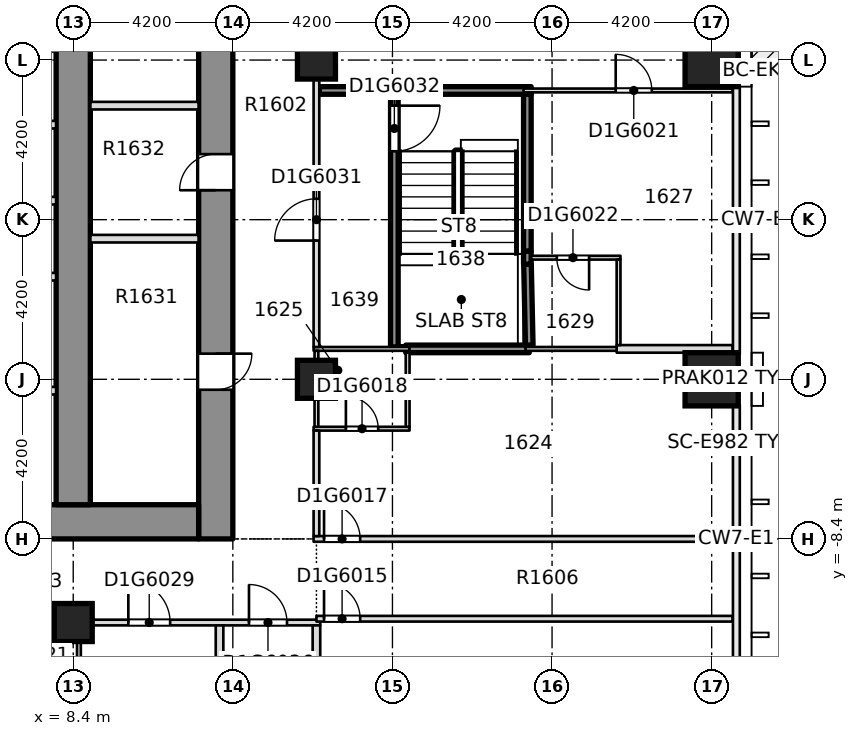
"""IFC4 building model, lengths in metres.
Left out: names, types, materials, properties, quantities, classifications, styles, units other than length and angle.
Written with IfcOpenShell. Run it as: python <this file> out.ifc"""

import sys

from ifc_helpers import new_model, si_unit, direction, frame, frame_2d, origin, origin_2d, place, context, subcontext, project, spatial, rectangle, extrude, element, fill, save


model = new_model("IFC4")
c1 = context("Model", 3, precision=1e-05, world=origin(), true_north=direction((0.0, 1.0)))
c2 = subcontext(c1, "Body", "Model", "MODEL_VIEW")
j1 = project(units=[si_unit("LENGTHUNIT", "METRE"), si_unit("PLANEANGLEUNIT", "RADIAN")], contexts=[c1])
p1 = place(None, origin())
s1 = spatial("IfcSite", under=j1, at=p1, CompositionType="ELEMENT")
p2 = place(p1, origin())
s2 = spatial("IfcBuilding", under=s1, at=p2, CompositionType="ELEMENT")
p3 = place(p2, frame((0.0, 0.0, 69.0)))
s3 = spatial("IfcBuildingStorey", under=s2, at=p3, CompositionType="ELEMENT", Elevation=69.0)
p4 = place(p3, frame((12.15, -8.4, -0.32), z_axis=(0.0, 0.0, 1.0), x_axis=(0.0, 1.0, 0.0)))
e1 = element("IfcWall", 1, at=p4, inside=s3, PredefinedType="SHEAR", context=c2, shape_type="SweptSolid", body=[
    extrude(rectangle(XDim=30.15, YDim=0.9, at=frame_2d((15.075, 0.0))), origin(), (0.0, 0.0, 1.0), 3.45),
])
p5 = place(p4, frame((3.925, 0.0, 0.32)))
e2 = element("IfcOpeningElement", 2, at=p5, cuts=e1, PredefinedType="OPENING", context=c2, shape_type="SweptSolid", body=[
    extrude(rectangle(XDim=0.95, YDim=2.1, at=frame_2d((0.475, 1.05))), frame((0.0, 0.46, 0.0), z_axis=(0.0, -1.0, 0.0), x_axis=(1.0, 0.0, 0.0)), (0.0, 0.0, 1.0), 0.92),
])
p6 = place(p4, frame((9.175, 0.0, 0.32)))
e3 = element("IfcOpeningElement", 3, at=p6, cuts=e1, PredefinedType="OPENING", context=c2, shape_type="SweptSolid", body=[
    extrude(rectangle(XDim=0.95, YDim=2.1, at=frame_2d((0.475, 1.05))), frame((0.0, 0.46, 0.0), z_axis=(0.0, -1.0, 0.0), x_axis=(1.0, 0.0, 0.0)), (0.0, 0.0, 1.0), 0.92),
])
p7 = place(p4, frame((14.525, 0.0, 0.32)))
e4 = element("IfcOpeningElement", 4, at=p7, cuts=e1, PredefinedType="OPENING", context=c2, shape_type="SweptSolid", body=[
    extrude(rectangle(XDim=0.95, YDim=2.1, at=frame_2d((0.475, 1.05))), frame((0.0, 0.46, 0.0), z_axis=(0.0, -1.0, 0.0), x_axis=(1.0, 0.0, 0.0)), (0.0, 0.0, 1.0), 0.92),
])
p8 = place(p4, frame((22.225, 0.0, 0.32)))
e5 = element("IfcOpeningElement", 5, at=p8, cuts=e1, PredefinedType="OPENING", context=c2, shape_type="SweptSolid", body=[
    extrude(rectangle(XDim=0.95, YDim=2.1, at=frame_2d((0.475, 1.05))), frame((0.0, 0.46, 0.0), z_axis=(0.0, -1.0, 0.0), x_axis=(1.0, 0.0, 0.0)), (0.0, 0.0, 1.0), 0.92),
])
p9 = place(p4, frame((26.25, 0.0, 0.32)))
e6 = element("IfcOpeningElement", 6, at=p9, cuts=e1, PredefinedType="OPENING", context=c2, shape_type="SweptSolid", body=[
    extrude(rectangle(XDim=0.95, YDim=2.1, at=frame_2d((0.475, 1.05))), frame((0.0, 0.46, 0.0), z_axis=(0.0, -1.0, 0.0), x_axis=(1.0, 0.0, 0.0)), (0.0, 0.0, 1.0), 0.92),
])
p10 = place(p4, frame((19.3, 0.0, 0.32)))
e7 = element("IfcOpeningElement", 7, at=p10, cuts=e1, PredefinedType="OPENING", context=c2, shape_type="SweptSolid", body=[
    extrude(rectangle(XDim=1.2, YDim=2.1, at=frame_2d((0.6, 1.05))), frame((0.0, 0.46, 0.0), z_axis=(0.0, -1.0, 0.0), x_axis=(1.0, 0.0, 0.0)), (0.0, 0.0, 1.0), 0.92),
])
p11 = place(p3, frame((-11.7, -7.95, -0.32), z_axis=(0.0, 0.0, 1.0), x_axis=(1.0, 0.0, 0.0)))
e8 = element("IfcWall", 8, at=p11, inside=s3, PredefinedType="SHEAR", context=c2, shape_type="SweptSolid", body=[
    extrude(rectangle(XDim=23.4, YDim=0.9, at=frame_2d((11.7, 0.0))), origin(), (0.0, 0.0, 1.0), 3.45),
])
p12 = place(p11, frame((6.95, 0.0, 0.32)))
e9 = element("IfcOpeningElement", 9, at=p12, cuts=e8, PredefinedType="OPENING", context=c2, shape_type="SweptSolid", body=[
    extrude(rectangle(XDim=1.8, YDim=2.1, at=frame_2d((0.9, 1.05))), frame((0.0, 0.46, 0.0), z_axis=(0.0, -1.0, 0.0), x_axis=(1.0, 0.0, 0.0)), (0.0, 0.0, 1.0), 0.92),
])
p13 = place(p11, frame((14.65, 0.0, 0.32)))
e10 = element("IfcOpeningElement", 10, at=p13, cuts=e8, PredefinedType="OPENING", context=c2, shape_type="SweptSolid", body=[
    extrude(rectangle(XDim=1.8, YDim=2.1, at=frame_2d((0.9, 1.05))), frame((0.0, 0.46, 0.0), z_axis=(0.0, -1.0, 0.0), x_axis=(1.0, 0.0, 0.0)), (0.0, 0.0, 1.0), 0.92),
])
p14 = place(p3, frame((8.4, -7.5, -0.32), z_axis=(0.0, 0.0, 1.0), x_axis=(0.0, 1.0, 0.0)))
e11 = element("IfcWall", 11, at=p14, inside=s3, PredefinedType="SHEAR", context=c2, shape_type="SweptSolid", body=[
    extrude(rectangle(XDim=28.35, YDim=0.9, at=frame_2d((14.175, 0.0))), origin(), (0.0, 0.0, 1.0), 3.45),
])
p15 = place(p14, frame((18.4, 0.0, 0.32)))
e12 = element("IfcOpeningElement", 12, at=p15, cuts=e11, PredefinedType="OPENING", context=c2, shape_type="SweptSolid", body=[
    extrude(rectangle(XDim=1.2, YDim=2.1, at=frame_2d((0.6, 1.05))), frame((0.0, 0.46, 0.0), z_axis=(0.0, -1.0, 0.0), x_axis=(1.0, 0.0, 0.0)), (0.0, 0.0, 1.0), 0.92),
])
for number, where, z_axis, x_axis in (
    (13, (25.2, -4.2, -0.32), (0.0, 0.0, 1.0), (1.0, 0.0, 0.0)),
    (14, (25.2, 4.2, -0.32), (0.0, 0.0, 1.0), (1.0, 0.0, 0.0)),
):
    element("IfcColumn", number, at=place(p3, frame(where, z_axis=z_axis, x_axis=x_axis)), inside=s3, PredefinedType="COLUMN", context=c2, shape_type="SweptSolid", body=[
        extrude(rectangle(XDim=1.4, YDim=1.4, at=origin_2d()), origin(), (0.0, 0.0, 1.0), 3.45),
    ])
for number, where, z_axis, x_axis in (
    (15, (8.4, -10.6, -0.32), (0.0, 0.0, 1.0), (1.0, 0.0, 0.0)),
    (16, (14.8, -4.2, -0.32), (0.0, 0.0, 1.0), (1.0, 0.0, 0.0)),
    (17, (14.8, 4.2, -0.32), (0.0, 0.0, 1.0), (1.0, 0.0, 0.0)),
):
    element("IfcColumn", number, at=place(p3, frame(where, z_axis=z_axis, x_axis=x_axis)), inside=s3, PredefinedType="COLUMN", context=c2, shape_type="SweptSolid", body=[
        extrude(rectangle(XDim=1.0, YDim=1.0, at=origin_2d()), origin(), (0.0, 0.0, 1.0), 3.45),
    ])
p16 = place(p3, frame((6.1, -10.6, 0.0), z_axis=(0.0, 0.0, 1.0), x_axis=(1.0, 0.0, 0.0)))
e18 = element("IfcWall", 18, at=p16, inside=s3, PredefinedType="PARTITIONING", context=c2, shape_type="SweptSolid", body=[
    extrude(rectangle(XDim=2.5, YDim=0.1, at=frame_2d((1.25, 0.0))), origin(), (0.0, 0.0, 1.0), 3.13),
])
p17 = place(p3, frame((8.5, -10.6, 0.0), z_axis=(0.0, 0.0, 1.0), x_axis=(1.0, 0.0, 0.0)))
e19 = element("IfcWall", 19, at=p17, inside=s3, PredefinedType="PARTITIONING", context=c2, shape_type="SweptSolid", body=[
    extrude(rectangle(XDim=6.4, YDim=0.15, at=frame_2d((3.2, 0.0))), origin(), (0.0, 0.0, 1.0), 3.13),
])
p18 = place(p17, frame((1.35, 0.0, 0.0)))
e20 = element("IfcOpeningElement", 20, at=p18, cuts=e19, PredefinedType="OPENING", context=c2, shape_type="SweptSolid", body=[
    extrude(rectangle(XDim=1.1, YDim=2.1, at=frame_2d((0.55, 1.05))), frame((0.0, 0.085, 0.0), z_axis=(0.0, -1.0, 0.0), x_axis=(1.0, 0.0, 0.0)), (0.0, 0.0, 1.0), 0.17),
])
p19 = place(p17, frame((4.525, 0.0, 0.0)))
e21 = element("IfcOpeningElement", 21, at=p19, cuts=e19, PredefinedType="OPENING", context=c2, shape_type="SweptSolid", body=[
    extrude(rectangle(XDim=1.0, YDim=2.1, at=frame_2d((0.5, 1.05))), frame((0.0, 0.085, 0.0), z_axis=(0.0, -1.0, 0.0), x_axis=(1.0, 0.0, 0.0)), (0.0, 0.0, 1.0), 0.17),
])
p20 = place(p3, frame((14.8, -10.5, 0.0), z_axis=(0.0, 0.0, 1.0), x_axis=(1.0, 0.0, 0.0)))
e22 = element("IfcWall", 22, at=p20, inside=s3, PredefinedType="PARTITIONING", context=c2, shape_type="SweptSolid", body=[
    extrude(rectangle(XDim=10.95, YDim=0.15, at=frame_2d((5.475, 0.0))), origin(), (0.0, 0.0, 1.0), 3.13),
])
p21 = place(p20, frame((0.2, 0.0, 0.0)))
e23 = element("IfcOpeningElement", 23, at=p21, cuts=e22, PredefinedType="OPENING", context=c2, shape_type="SweptSolid", body=[
    extrude(rectangle(XDim=0.95, YDim=2.1, at=frame_2d((0.475, 1.05))), frame((0.0, 0.085, 0.0), z_axis=(0.0, -1.0, 0.0), x_axis=(1.0, 0.0, 0.0)), (0.0, 0.0, 1.0), 0.17),
])
p22 = place(p3, frame((14.725, -8.4, 0.0), z_axis=(0.0, 0.0, 1.0), x_axis=(1.0, 0.0, 0.0)))
e24 = element("IfcWall", 24, at=p22, inside=s3, PredefinedType="PARTITIONING", context=c2, shape_type="SweptSolid", body=[
    extrude(rectangle(XDim=11.025, YDim=0.15, at=frame_2d((5.512, 0.0))), origin(), (0.0, 0.0, 1.0), 3.13),
])
p23 = place(p22, frame((0.275, 0.0, 0.0)))
e25 = element("IfcOpeningElement", 25, at=p23, cuts=e24, PredefinedType="OPENING", context=c2, shape_type="SweptSolid", body=[
    extrude(rectangle(XDim=0.95, YDim=2.1, at=frame_2d((0.475, 1.05))), frame((0.0, 0.085, 0.0), z_axis=(0.0, -1.0, 0.0), x_axis=(1.0, 0.0, 0.0)), (0.0, 0.0, 1.0), 0.17),
])
p24 = place(p3, frame((14.725, -5.5, 0.0), z_axis=(0.0, 0.0, 1.0), x_axis=(1.0, 0.0, 0.0)))
e26 = element("IfcWall", 26, at=p24, inside=s3, PredefinedType="PARTITIONING", context=c2, shape_type="SweptSolid", body=[
    extrude(rectangle(XDim=2.525, YDim=0.1, at=frame_2d((1.262, 0.0))), origin(), (0.0, 0.0, 1.0), 3.13),
])
p25 = place(p24, frame((0.85, 0.0, 0.0)))
e27 = element("IfcOpeningElement", 27, at=p25, cuts=e26, PredefinedType="OPENING", context=c2, shape_type="SweptSolid", body=[
    extrude(rectangle(XDim=0.85, YDim=2.1, at=frame_2d((0.425, 1.05))), frame((0.0, 0.06, 0.0), z_axis=(0.0, -1.0, 0.0), x_axis=(1.0, 0.0, 0.0)), (0.0, 0.0, 1.0), 0.12),
])
p26 = place(p3, frame((14.725, -3.4, 0.0), z_axis=(0.0, 0.0, 1.0), x_axis=(1.0, 0.0, 0.0)))
e28 = element("IfcWall", 28, at=p26, inside=s3, PredefinedType="PARTITIONING", context=c2, shape_type="SweptSolid", body=[
    extrude(rectangle(XDim=2.525, YDim=0.1, at=frame_2d((1.262, 0.0))), origin(), (0.0, 0.0, 1.0), 3.13),
])
p27 = place(p3, frame((17.15, -3.4, 0.0), z_axis=(0.0, 0.0, 1.0), x_axis=(1.0, 0.0, 0.0)))
e29 = element("IfcWall", 29, at=p27, inside=s3, PredefinedType="SOLIDWALL", context=c2, shape_type="SweptSolid", body=[
    extrude(rectangle(XDim=3.25, YDim=0.2, at=frame_2d((1.625, 0.0))), origin(), (0.0, 0.0, 1.0), 3.13),
])
p28 = place(p3, frame((20.3, -3.4, 0.0), z_axis=(0.0, 0.0, 1.0), x_axis=(1.0, 0.0, 0.0)))
e30 = element("IfcWall", 30, at=p28, inside=s3, PredefinedType="PARTITIONING", context=c2, shape_type="SweptSolid", body=[
    extrude(rectangle(XDim=2.5, YDim=0.1, at=frame_2d((1.25, 0.0))), origin(), (0.0, 0.0, 1.0), 3.13),
])
p29 = place(p3, frame((22.7, -3.4, 0.0), z_axis=(0.0, 0.0, 1.0), x_axis=(1.0, 0.0, 0.0)))
e31 = element("IfcWall", 31, at=p29, inside=s3, PredefinedType="PARTITIONING", context=c2, shape_type="SweptSolid", body=[
    extrude(rectangle(XDim=3.05, YDim=0.2, at=frame_2d((1.525, 0.0))), origin(), (0.0, 0.0, 1.0), 3.13),
])
p30 = place(p3, frame((20.45, -1.0, 0.0), z_axis=(0.0, 0.0, 1.0), x_axis=(1.0, 0.0, 0.0)))
e32 = element("IfcWall", 32, at=p30, inside=s3, PredefinedType="PARTITIONING", context=c2, shape_type="SweptSolid", body=[
    extrude(rectangle(XDim=2.35, YDim=0.1, at=frame_2d((1.175, 0.0))), origin(), (0.0, 0.0, 1.0), 3.13),
])
p31 = place(p30, frame((0.675, 0.0, 0.0)))
e33 = element("IfcOpeningElement", 33, at=p31, cuts=e32, PredefinedType="OPENING", context=c2, shape_type="SweptSolid", body=[
    extrude(rectangle(XDim=0.85, YDim=2.1, at=frame_2d((0.425, 1.05))), frame((0.0, 0.06, 0.0), z_axis=(0.0, -1.0, 0.0), x_axis=(1.0, 0.0, 0.0)), (0.0, 0.0, 1.0), 0.12),
])
p32 = place(p3, frame((14.875, 3.4, 0.0), z_axis=(0.0, 0.0, 1.0), x_axis=(1.0, 0.0, 0.0)))
e34 = element("IfcWall", 34, at=p32, inside=s3, PredefinedType="SOLIDWALL", context=c2, shape_type="SweptSolid", body=[
    extrude(rectangle(XDim=5.575, YDim=0.2, at=frame_2d((2.788, 0.0))), origin(), (0.0, 0.0, 1.0), 3.13),
])
p33 = place(p3, frame((20.25, 3.4, 0.0), z_axis=(0.0, 0.0, 1.0), x_axis=(1.0, 0.0, 0.0)))
e35 = element("IfcWall", 35, at=p33, inside=s3, PredefinedType="PARTITIONING", context=c2, shape_type="SweptSolid", body=[
    extrude(rectangle(XDim=5.5, YDim=0.1, at=frame_2d((2.75, 0.0))), origin(), (0.0, 0.0, 1.0), 3.13),
])
p34 = place(p33, frame((2.425, 0.0, 0.0)))
e36 = element("IfcOpeningElement", 36, at=p34, cuts=e35, PredefinedType="OPENING", context=c2, shape_type="SweptSolid", body=[
    extrude(rectangle(XDim=0.95, YDim=2.1, at=frame_2d((0.475, 1.05))), frame((0.0, 0.06, 0.0), z_axis=(0.0, -1.0, 0.0), x_axis=(1.0, 0.0, 0.0)), (0.0, 0.0, 1.0), 0.12),
])
p35 = place(p3, frame((8.55, -13.25, 0.0), z_axis=(0.0, 0.0, 1.0), x_axis=(0.0, 1.0, 0.0)))
e37 = element("IfcWall", 37, at=p35, inside=s3, PredefinedType="PARTITIONING", context=c2, shape_type="SweptSolid", body=[
    extrude(rectangle(XDim=2.575, YDim=0.1, at=frame_2d((1.288, 0.0))), origin(), (0.0, 0.0, 1.0), 3.13),
])
p36 = place(p3, frame((12.25, -12.998, 0.0), z_axis=(0.0, 0.0, 1.0), x_axis=(0.0, 1.0, 0.0)))
e38 = element("IfcWall", 38, at=p36, inside=s3, PredefinedType="PARTITIONING", context=c2, shape_type="SweptSolid", body=[
    extrude(rectangle(XDim=2.323, YDim=0.2, at=frame_2d((1.162, 0.0))), origin(), (0.0, 0.0, 1.0), 3.13),
])
p37 = place(p3, frame((14.8, -14.65, 0.0), z_axis=(0.0, 0.0, 1.0), x_axis=(0.0, 1.0, 0.0)))
e39 = element("IfcWall", 39, at=p37, inside=s3, PredefinedType="PARTITIONING", context=c2, shape_type="SweptSolid", body=[
    extrude(rectangle(XDim=3.975, YDim=0.2, at=frame_2d((1.987, 0.0))), origin(), (0.0, 0.0, 1.0), 3.13),
])
p38 = place(p3, frame((14.8, -8.325, 0.0), z_axis=(0.0, 0.0, 1.0), x_axis=(0.0, 1.0, 0.0)))
e40 = element("IfcWall", 40, at=p38, inside=s3, PredefinedType="PARTITIONING", context=c2, shape_type="SweptSolid", body=[
    extrude(rectangle(XDim=2.775, YDim=0.15, at=frame_2d((1.387, 0.0))), origin(), (0.0, 0.0, 1.0), 3.13),
])
p39 = place(p3, frame((14.8, -5.45, 0.0), z_axis=(0.0, 0.0, 1.0), x_axis=(0.0, 1.0, 0.0)))
e41 = element("IfcWall", 41, at=p39, inside=s3, PredefinedType="PARTITIONING", context=c2, shape_type="SweptSolid", body=[
    extrude(rectangle(XDim=2.0, YDim=0.1, at=frame_2d((1.0, 0.0))), origin(), (0.0, 0.0, 1.0), 3.13),
])
p40 = place(p3, frame((14.8, -3.35, 0.0), z_axis=(0.0, 0.0, 1.0), x_axis=(0.0, 1.0, 0.0)))
e42 = element("IfcWall", 42, at=p40, inside=s3, PredefinedType="PARTITIONING", context=c2, shape_type="SweptSolid", body=[
    extrude(rectangle(XDim=13.775, YDim=0.15, at=frame_2d((6.888, 0.0))), origin(), (0.0, 0.0, 1.0), 3.13),
])
p41 = place(p40, frame((2.8, 0.0, 0.0)))
e43 = element("IfcOpeningElement", 43, at=p41, cuts=e42, PredefinedType="OPENING", context=c2, shape_type="SweptSolid", body=[
    extrude(rectangle(XDim=1.1, YDim=2.1, at=frame_2d((0.55, 1.05))), frame((0.0, 0.085, 0.0), z_axis=(0.0, -1.0, 0.0), x_axis=(1.0, 0.0, 0.0)), (0.0, 0.0, 1.0), 0.17),
])
p42 = place(p3, frame((16.85, -3.35, 0.0), z_axis=(0.0, 0.0, 1.0), x_axis=(0.0, 1.0, 0.0)))
e44 = element("IfcWall", 44, at=p42, inside=s3, PredefinedType="SOLIDWALL", context=c2, shape_type="SweptSolid", body=[
    extrude(rectangle(XDim=6.65, YDim=0.2, at=frame_2d((3.325, 0.0))), origin(), (0.0, 0.0, 1.0), 3.13),
])
p43 = place(p42, frame((5.15, 0.0, 0.0)))
e45 = element("IfcOpeningElement", 45, at=p43, cuts=e44, PredefinedType="OPENING", context=c2, shape_type="SweptSolid", body=[
    extrude(rectangle(XDim=1.2, YDim=2.1, at=frame_2d((0.6, 1.05))), frame((0.0, 0.11, 0.0), z_axis=(0.0, -1.0, 0.0), x_axis=(1.0, 0.0, 0.0)), (0.0, 0.0, 1.0), 0.22),
])
p44 = place(p3, frame((17.2, -5.45, 0.0), z_axis=(0.0, 0.0, 1.0), x_axis=(0.0, 1.0, 0.0)))
e46 = element("IfcWall", 46, at=p44, inside=s3, PredefinedType="PARTITIONING", context=c2, shape_type="SweptSolid", body=[
    extrude(rectangle(XDim=1.95, YDim=0.1, at=frame_2d((0.975, 0.0))), origin(), (0.0, 0.0, 1.0), 3.13),
])
p45 = place(p3, frame((20.4, -3.3, 0.0), z_axis=(0.0, 0.0, 1.0), x_axis=(-0.021771342749, 0.999762976227, 0.0)))
e47 = element("IfcWall", 47, at=p45, inside=s3, PredefinedType="SOLIDWALL", context=c2, shape_type="SweptSolid", body=[
    extrude(rectangle(XDim=2.131, YDim=0.2, at=frame_2d((1.065, 0.0))), origin(), (0.0, 0.0, 1.0), 3.13),
])
p46 = place(p3, frame((20.35, -0.83, 0.0), z_axis=(0.0, 0.0, 1.0), x_axis=(0.0, 1.0, 0.0)))
e48 = element("IfcWall", 48, at=p46, inside=s3, PredefinedType="SOLIDWALL", context=c2, shape_type="SweptSolid", body=[
    extrude(rectangle(XDim=4.13, YDim=0.2, at=frame_2d((2.065, 0.0))), origin(), (0.0, 0.0, 1.0), 3.13),
])
p47 = place(p3, frame((22.75, -3.3, 0.0), z_axis=(0.0, 0.0, 1.0), x_axis=(0.0, 1.0, 0.0)))
e49 = element("IfcWall", 49, at=p47, inside=s3, PredefinedType="PARTITIONING", context=c2, shape_type="SweptSolid", body=[
    extrude(rectangle(XDim=2.25, YDim=0.1, at=frame_2d((1.125, 0.0))), origin(), (0.0, 0.0, 1.0), 3.13),
])
for number, where, z_axis, x_axis in (
    (50, (5.575, -4.5, 0.0), (0.0, 0.0, 1.0), (1.0, 0.0, 0.0)),
    (51, (5.575, -1.5, 0.0), (0.0, 0.0, 1.0), (1.0, 0.0, 0.0)),
    (52, (5.575, 0.5, 0.0), (0.0, 0.0, 1.0), (1.0, 0.0, 0.0)),
    (53, (5.575, 2.5, 0.0), (0.0, 0.0, 1.0), (1.0, 0.0, 0.0)),
):
    element("IfcWall", number, at=place(p3, frame(where, z_axis=z_axis, x_axis=x_axis)), inside=s3, PredefinedType="PARTITIONING", context=c2, shape_type="SweptSolid", body=[
        extrude(rectangle(XDim=2.374, YDim=0.2, at=frame_2d((1.187, 0.0))), origin(), (0.0, 0.0, 1.0), 3.13),
    ])
for number, where, z_axis, x_axis in (
    (54, (8.851, -0.5, 0.0), (0.0, 0.0, 1.0), (1.0, 0.0, 0.0)),
    (55, (8.851, 3.0, 0.0), (0.0, 0.0, 1.0), (1.0, 0.0, 0.0)),
):
    element("IfcWall", number, at=place(p3, frame(where, z_axis=z_axis, x_axis=x_axis)), inside=s3, PredefinedType="PARTITIONING", context=c2, shape_type="SweptSolid", body=[
        extrude(rectangle(XDim=2.848, YDim=0.2, at=frame_2d((1.424, 0.0))), origin(), (0.0, 0.0, 1.0), 3.13),
    ])
p48 = place(p3, frame((20.35, -1.17, 0.0), z_axis=(0.0, 0.0, 1.0), x_axis=(0.0, 1.0, 0.0)))
e56 = element("IfcWall", 56, at=p48, inside=s3, PredefinedType="SOLIDWALL", context=c2, shape_type="SweptSolid", body=[
    extrude(rectangle(XDim=0.34, YDim=0.2, at=frame_2d((0.17, 0.0))), origin(), (0.0, 0.0, 1.0), 3.13),
])
p49 = place(p21, origin())
e57 = element("IfcDoor", 57, at=p49, inside=s3, OperationType="SINGLE_SWING_RIGHT", PredefinedType="DOOR", context=c2, shape_type="SweptSolid", body=[
    extrude(rectangle(XDim=0.95, YDim=2.1, at=frame_2d((0.475, 1.05))), frame((0.0, 0.025, 0.0), z_axis=(0.0, -1.0, 0.0), x_axis=(1.0, 0.0, 0.0)), (0.0, 0.0, 1.0), 0.05),
])
fill(e23, e57)
p50 = place(p23, origin())
e58 = element("IfcDoor", 58, at=p50, inside=s3, OperationType="SINGLE_SWING_LEFT", PredefinedType="DOOR", context=c2, shape_type="SweptSolid", body=[
    extrude(rectangle(XDim=0.95, YDim=2.1, at=frame_2d((0.475, 1.05))), frame((0.0, 0.025, 0.0), z_axis=(0.0, -1.0, 0.0), x_axis=(1.0, 0.0, 0.0)), (0.0, 0.0, 1.0), 0.05),
])
fill(e25, e58)
p51 = place(p25, origin())
e59 = element("IfcDoor", 59, at=p51, inside=s3, OperationType="SINGLE_SWING_LEFT", PredefinedType="DOOR", context=c2, shape_type="SweptSolid", body=[
    extrude(rectangle(XDim=0.85, YDim=2.1, at=frame_2d((0.425, 1.05))), frame((0.0, 0.025, 0.0), z_axis=(0.0, -1.0, 0.0), x_axis=(1.0, 0.0, 0.0)), (0.0, 0.0, 1.0), 0.05),
])
fill(e27, e59)
p52 = place(p34, origin())
e60 = element("IfcDoor", 60, at=p52, inside=s3, OperationType="SINGLE_SWING_LEFT", PredefinedType="DOOR", context=c2, shape_type="SweptSolid", body=[
    extrude(rectangle(XDim=0.95, YDim=2.1, at=frame_2d((0.475, 1.05))), frame((0.0, 0.025, 0.0), z_axis=(0.0, -1.0, 0.0), x_axis=(1.0, 0.0, 0.0)), (0.0, 0.0, 1.0), 0.05),
])
fill(e36, e60)
p53 = place(p31, origin())
e61 = element("IfcDoor", 61, at=p53, inside=s3, OperationType="SINGLE_SWING_RIGHT", PredefinedType="DOOR", context=c2, shape_type="SweptSolid", body=[
    extrude(rectangle(XDim=0.85, YDim=2.1, at=frame_2d((0.425, 1.05))), frame((0.0, 0.025, 0.0), z_axis=(0.0, -1.0, 0.0), x_axis=(1.0, 0.0, 0.0)), (0.0, 0.0, 1.0), 0.05),
])
fill(e33, e61)
p54 = place(p18, origin())
e62 = element("IfcDoor", 62, at=p54, inside=s3, OperationType="SINGLE_SWING_RIGHT", PredefinedType="DOOR", context=c2, shape_type="SweptSolid", body=[
    extrude(rectangle(XDim=1.1, YDim=2.1, at=frame_2d((0.55, 1.05))), frame((0.0, 0.025, 0.0), z_axis=(0.0, -1.0, 0.0), x_axis=(1.0, 0.0, 0.0)), (0.0, 0.0, 1.0), 0.05),
])
fill(e20, e62)
p55 = place(p41, origin())
e63 = element("IfcDoor", 63, at=p55, inside=s3, OperationType="SINGLE_SWING_LEFT", PredefinedType="DOOR", context=c2, shape_type="SweptSolid", body=[
    extrude(rectangle(XDim=1.1, YDim=2.1, at=frame_2d((0.55, 1.05))), frame((0.0, 0.025, 0.0), z_axis=(0.0, -1.0, 0.0), x_axis=(1.0, 0.0, 0.0)), (0.0, 0.0, 1.0), 0.05),
])
fill(e43, e63)
p56 = place(p43, origin())
e64 = element("IfcDoor", 64, at=p56, inside=s3, OperationType="SINGLE_SWING_LEFT", PredefinedType="DOOR", context=c2, shape_type="SweptSolid", body=[
    extrude(rectangle(XDim=1.2, YDim=2.1, at=frame_2d((0.6, 1.05))), frame((0.0, 0.025, 0.0), z_axis=(0.0, -1.0, 0.0), x_axis=(1.0, 0.0, 0.0)), (0.0, 0.0, 1.0), 0.05),
])
fill(e45, e64)
p57 = place(p19, origin())
e65 = element("IfcDoor", 65, at=p57, inside=s3, OperationType="SINGLE_SWING_RIGHT", PredefinedType="DOOR", context=c2, shape_type="SweptSolid", body=[
    extrude(rectangle(XDim=1.0, YDim=2.1, at=frame_2d((0.5, 1.05))), frame((0.0, 0.025, 0.0), z_axis=(0.0, -1.0, 0.0), x_axis=(1.0, 0.0, 0.0)), (0.0, 0.0, 1.0), 0.05),
])
fill(e21, e65)
p58 = place(p5, origin())
e66 = element("IfcDoor", 66, at=p58, inside=s3, OperationType="SINGLE_SWING_LEFT", PredefinedType="DOOR", context=c2, shape_type="SweptSolid", body=[
    extrude(rectangle(XDim=0.95, YDim=2.1, at=frame_2d((0.475, 1.05))), frame((0.0, 0.025, 0.0), z_axis=(0.0, -1.0, 0.0), x_axis=(1.0, 0.0, 0.0)), (0.0, 0.0, 1.0), 0.05),
])
fill(e2, e66)
p59 = place(p6, origin())
e67 = element("IfcDoor", 67, at=p59, inside=s3, OperationType="SINGLE_SWING_LEFT", PredefinedType="DOOR", context=c2, shape_type="SweptSolid", body=[
    extrude(rectangle(XDim=0.95, YDim=2.1, at=frame_2d((0.475, 1.05))), frame((0.0, 0.025, 0.0), z_axis=(0.0, -1.0, 0.0), x_axis=(1.0, 0.0, 0.0)), (0.0, 0.0, 1.0), 0.05),
])
fill(e3, e67)
save(model, sys.argv[1])
